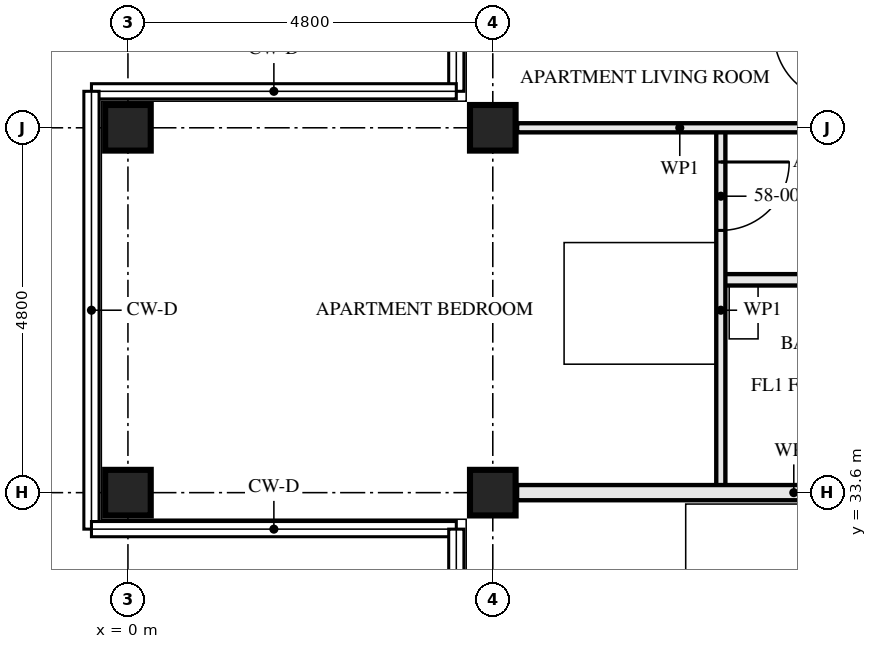
"""IFC4 building model, lengths in metres.
Left out: names, types, materials, properties, quantities, classifications, styles, units other than length and angle.
Written with IfcOpenShell. Run it as: python <this file> out.ifc"""

import sys

from ifc_helpers import new_model, si_unit, direction, frame, frame_2d, origin, origin_2d, place, context, subcontext, project, spatial, rectangle, hollow_rectangle, extrude, element, fill, save


model = new_model("IFC4")
c1 = context("Model", 3, precision=1e-05, world=origin(), true_north=direction((0.0, 1.0)))
c2 = subcontext(c1, "Body", "Model", "MODEL_VIEW")
j1 = project(units=[si_unit("LENGTHUNIT", "METRE"), si_unit("PLANEANGLEUNIT", "RADIAN")], contexts=[c1])
p1 = place(None, origin())
s1 = spatial("IfcSite", under=j1, at=p1, CompositionType="ELEMENT")
p2 = place(p1, origin())
s2 = spatial("IfcBuilding", under=s1, at=p2, CompositionType="ELEMENT")
p3 = place(p2, frame((0.0, 0.0, 212.0)))
s3 = spatial("IfcBuildingStorey", under=s2, at=p3, CompositionType="ELEMENT", Elevation=212.0)
for number, where, z_axis, x_axis in (
    (1, (0.0, 33.6, 0.0), (0.0, 0.0, 1.0), (0.0, 1.0, 0.0)),
    (2, (0.0, 38.4, 0.0), (0.0, 0.0, 1.0), (0.0, 1.0, 0.0)),
    (3, (4.8, 33.6, 0.0), (0.0, 0.0, 1.0), (0.0, 1.0, 0.0)),
    (4, (4.8, 38.4, 0.0), (0.0, 0.0, 1.0), (0.0, 1.0, 0.0)),
):
    element("IfcColumn", number, at=place(p3, frame(where, z_axis=z_axis, x_axis=x_axis)), inside=s3, PredefinedType="COLUMN", context=c2, shape_type="SweptSolid", body=[
        extrude(hollow_rectangle(XDim=0.6, YDim=0.6, WallThickness=0.05, at=origin_2d()), origin(), (0.0, 0.0, 1.0), 3.5),
    ])
p4 = place(p3, frame((7.8, 36.4, 0.0), z_axis=(0.0, 0.0, 1.0), x_axis=(1.0, 0.0, 0.0)))
e5 = element("IfcWall", 5, at=p4, inside=s3, PredefinedType="PARTITIONING", context=c2, shape_type="SweptSolid", body=[
    extrude(rectangle(XDim=3.0, YDim=0.15, at=frame_2d((1.5, 0.0))), origin(), (0.0, 0.0, 1.0), 3.33),
])
p5 = place(p4, frame((1.05, 0.0, 0.0)))
e6 = element("IfcOpeningElement", 6, at=p5, cuts=e5, PredefinedType="OPENING", context=c2, shape_type="SweptSolid", body=[
    extrude(rectangle(XDim=0.9, YDim=2.1, at=frame_2d((0.45, 1.05))), frame((0.0, 0.085, 0.0), z_axis=(0.0, -1.0, 0.0), x_axis=(1.0, 0.0, 0.0)), (0.0, 0.0, 1.0), 0.171),
])
p6 = place(p3, frame((7.8, 38.4, 0.0), z_axis=(0.0, 0.0, 1.0), x_axis=(0.0, -1.0, 0.0)))
e7 = element("IfcWall", 7, at=p6, inside=s3, PredefinedType="PARTITIONING", context=c2, shape_type="SweptSolid", body=[
    extrude(rectangle(XDim=4.8, YDim=0.12, at=frame_2d((2.4, 0.0))), origin(), (0.0, 0.0, 1.0), 3.33),
])
p7 = place(p6, frame((0.45, 0.0, 0.0)))
e8 = element("IfcOpeningElement", 8, at=p7, cuts=e7, PredefinedType="OPENING", context=c2, shape_type="SweptSolid", body=[
    extrude(rectangle(XDim=0.9, YDim=2.1, at=frame_2d((0.45, 1.05))), frame((0.0, 0.071, 0.0), z_axis=(0.0, -1.0, 0.0), x_axis=(1.0, 0.0, 0.0)), (0.0, 0.0, 1.0), 0.141),
])
p8 = place(p3, frame((5.12, 38.4, 0.0), z_axis=(0.0, 0.0, 1.0), x_axis=(1.0, 0.0, 0.0)))
e9 = element("IfcWall", 9, at=p8, inside=s3, PredefinedType="PARTITIONING", context=c2, shape_type="SweptSolid", body=[
    extrude(rectangle(XDim=4.28, YDim=0.12, at=frame_2d((2.14, 0.0))), origin(), (0.0, 0.0, 1.0), 2.55),
])
p9 = place(p3, frame((5.12, 33.6, 0.0), z_axis=(0.0, 0.0, 1.0), x_axis=(1.0, 0.0, 0.0)))
e10 = element("IfcWall", 10, at=p9, inside=s3, PredefinedType="PARTITIONING", context=c2, shape_type="SweptSolid", body=[
    extrude(rectangle(XDim=7.28, YDim=0.2, at=frame_2d((3.64, 0.0))), origin(), (0.0, 0.0, 1.0), 2.55),
])
p10 = place(p7, origin())
e11 = element("IfcDoor", 11, at=p10, inside=s3, OperationType="SINGLE_SWING_RIGHT", PredefinedType="DOOR", context=c2, shape_type="SweptSolid", body=[
    extrude(rectangle(XDim=0.9, YDim=2.1, at=frame_2d((0.45, 1.05))), frame((0.0, 0.022, 0.0), z_axis=(0.0, -1.0, 0.0), x_axis=(1.0, 0.0, 0.0)), (0.0, 0.0, 1.0), 0.044),
])
fill(e8, e11)
save(model, sys.argv[1])
